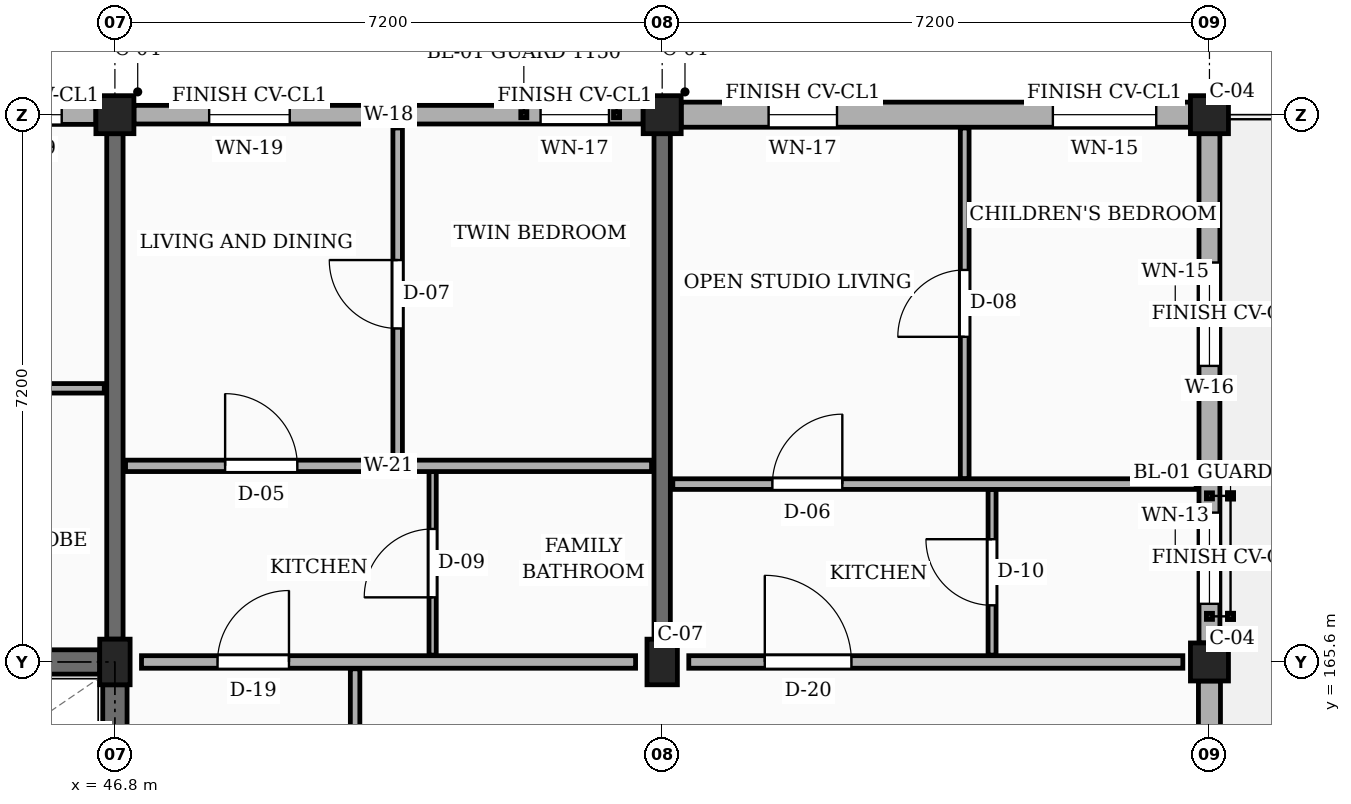
"""IFC4 building model, lengths in metres.
Left out: names, types, materials, properties, quantities, classifications, styles, units other than length and angle.
Written with IfcOpenShell. Run it as: python <this file> out.ifc"""

import sys

from ifc_helpers import new_model, si_unit, direction, frame, frame_2d, origin, origin_2d, place, context, subcontext, project, spatial, rectangle, extrude, element, fill, save


model = new_model("IFC4")
c1 = context("Model", 3, precision=1e-05, world=origin(), true_north=direction((0.0, 1.0)))
c2 = subcontext(c1, "Body", "Model", "MODEL_VIEW")
j1 = project(units=[si_unit("LENGTHUNIT", "METRE"), si_unit("PLANEANGLEUNIT", "RADIAN")], contexts=[c1])
p1 = place(None, origin())
s1 = spatial("IfcSite", under=j1, at=p1, CompositionType="ELEMENT")
p2 = place(p1, origin())
s2 = spatial("IfcBuilding", under=s1, at=p2, CompositionType="ELEMENT")
p3 = place(p2, frame((0.0, 0.0, 26.55)))
s3 = spatial("IfcBuildingStorey", under=s2, at=p3, CompositionType="ELEMENT", Elevation=26.55)
p4 = place(p3, frame((46.8, 165.6, 0.0), z_axis=(0.0, 0.0, 1.0), x_axis=(1.0, 0.0, 0.0)))
e1 = element("IfcColumn", 1, at=p4, inside=s3, PredefinedType="COLUMN", context=c2, shape_type="SweptSolid", body=[
    extrude(rectangle(XDim=0.4, YDim=0.6, at=origin_2d()), origin(), (0.0, 0.0, 1.0), 3.15),
])
p5 = place(p3, frame((46.8, 172.8, 0.0), z_axis=(0.0, 0.0, 1.0), x_axis=(1.0, 0.0, 0.0)))
e2 = element("IfcColumn", 2, at=p5, inside=s3, PredefinedType="COLUMN", context=c2, shape_type="SweptSolid", body=[
    extrude(rectangle(XDim=0.5, YDim=0.5, at=origin_2d()), origin(), (0.0, 0.0, 1.0), 3.15),
])
p6 = place(p3, frame((54.0, 165.6, 0.0), z_axis=(0.0, 0.0, 1.0), x_axis=(1.0, 0.0, 0.0)))
e3 = element("IfcColumn", 3, at=p6, inside=s3, PredefinedType="COLUMN", context=c2, shape_type="SweptSolid", body=[
    extrude(rectangle(XDim=0.4, YDim=0.6, at=origin_2d()), origin(), (0.0, 0.0, 1.0), 3.15),
])
for number, where, z_axis, x_axis in (
    (4, (54.0, 172.8, 0.0), (0.0, 0.0, 1.0), (1.0, 0.0, 0.0)),
    (5, (61.2, 165.6, 0.0), (0.0, 0.0, 1.0), (1.0, 0.0, 0.0)),
    (6, (61.2, 172.8, 0.0), (0.0, 0.0, 1.0), (1.0, 0.0, 0.0)),
):
    element("IfcColumn", number, at=place(p3, frame(where, z_axis=z_axis, x_axis=x_axis)), inside=s3, PredefinedType="COLUMN", context=c2, shape_type="SweptSolid", body=[
        extrude(rectangle(XDim=0.5, YDim=0.5, at=origin_2d()), origin(), (0.0, 0.0, 1.0), 3.15),
    ])
for number, where, z_axis, x_axis in (
    (7, (46.8, 165.9, 0.0), (0.0, 0.0, 1.0), (0.0, 1.0, 0.0)),
    (8, (54.0, 165.9, 0.0), (0.0, 0.0, 1.0), (0.0, 1.0, 0.0)),
):
    element("IfcWall", number, at=place(p3, frame(where, z_axis=z_axis, x_axis=x_axis)), inside=s3, PredefinedType="SOLIDWALL", context=c2, shape_type="SweptSolid", body=[
        extrude(rectangle(XDim=6.65, YDim=0.215, at=frame_2d((3.325, 0.0))), origin(), (0.0, 0.0, 1.0), 2.185),
    ])
p7 = place(p3, frame((61.2, 158.65, 0.0), z_axis=(0.0, 0.0, 1.0), x_axis=(0.0, 1.0, 0.0)))
e9 = element("IfcWall", 9, at=p7, inside=s3, PredefinedType="SOLIDWALL", context=c2, shape_type="SweptSolid", body=[
    extrude(rectangle(XDim=6.7, YDim=0.29, at=frame_2d((3.35, 0.0))), origin(), (0.0, 0.0, 1.0), 2.455),
])
p8 = place(p7, frame((0.45, 0.0, 0.78)))
e10 = element("IfcOpeningElement", 10, at=p8, cuts=e9, PredefinedType="OPENING", context=c2, shape_type="SweptSolid", body=[
    extrude(rectangle(XDim=1.04, YDim=1.26, at=frame_2d((0.52, 0.63))), frame((0.0, 0.155, 0.0), z_axis=(0.0, -1.0, 0.0), x_axis=(1.0, 0.0, 0.0)), (0.0, 0.0, 1.0), 0.31),
])
p9 = place(p7, frame((4.65, 0.0, 0.78)))
e11 = element("IfcOpeningElement", 11, at=p9, cuts=e9, PredefinedType="OPENING", context=c2, shape_type="SweptSolid", body=[
    extrude(rectangle(XDim=1.2, YDim=1.26, at=frame_2d((0.6, 0.63))), frame((0.0, 0.155, 0.0), z_axis=(0.0, -1.0, 0.0), x_axis=(1.0, 0.0, 0.0)), (0.0, 0.0, 1.0), 0.31),
])
p10 = place(p3, frame((61.2, 165.85, 0.0), z_axis=(0.0, 0.0, 1.0), x_axis=(0.0, 1.0, 0.0)))
e12 = element("IfcWall", 12, at=p10, inside=s3, PredefinedType="SOLIDWALL", context=c2, shape_type="SweptSolid", body=[
    extrude(rectangle(XDim=6.7, YDim=0.275, at=frame_2d((3.35, 0.0))), origin(), (0.0, 0.0, 1.0), 2.455),
])
p11 = place(p10, frame((0.515, 0.0, 0.78)))
e13 = element("IfcOpeningElement", 13, at=p11, cuts=e12, PredefinedType="OPENING", context=c2, shape_type="SweptSolid", body=[
    extrude(rectangle(XDim=1.2, YDim=1.26, at=frame_2d((0.6, 0.63))), frame((0.0, 0.147, 0.0), z_axis=(0.0, -1.0, 0.0), x_axis=(1.0, 0.0, 0.0)), (0.0, 0.0, 1.0), 0.295),
])
p12 = place(p10, frame((3.645, 0.0, 0.78)))
e14 = element("IfcOpeningElement", 14, at=p12, cuts=e12, PredefinedType="OPENING", context=c2, shape_type="SweptSolid", body=[
    extrude(rectangle(XDim=1.36, YDim=1.26, at=frame_2d((0.68, 0.63))), frame((0.0, 0.147, 0.0), z_axis=(0.0, -1.0, 0.0), x_axis=(1.0, 0.0, 0.0)), (0.0, 0.0, 1.0), 0.295),
])
p13 = place(p3, frame((60.95, 172.8, 0.0), z_axis=(0.0, 0.0, 1.0), x_axis=(-1.0, 0.0, 0.0)))
e15 = element("IfcWall", 15, at=p13, inside=s3, PredefinedType="SOLIDWALL", context=c2, shape_type="SweptSolid", body=[
    extrude(rectangle(XDim=6.7, YDim=0.33, at=frame_2d((3.35, 0.0))), origin(), (0.0, 0.0, 1.0), 2.455),
])
p14 = place(p13, frame((0.45, 0.0, 0.78)))
e16 = element("IfcOpeningElement", 16, at=p14, cuts=e15, PredefinedType="OPENING", context=c2, shape_type="SweptSolid", body=[
    extrude(rectangle(XDim=1.36, YDim=1.26, at=frame_2d((0.68, 0.63))), frame((0.0, 0.175, 0.0), z_axis=(0.0, -1.0, 0.0), x_axis=(1.0, 0.0, 0.0)), (0.0, 0.0, 1.0), 0.35),
])
p15 = place(p13, frame((4.65, 0.0, 0.78)))
e17 = element("IfcOpeningElement", 17, at=p15, cuts=e15, PredefinedType="OPENING", context=c2, shape_type="SweptSolid", body=[
    extrude(rectangle(XDim=0.9, YDim=1.36, at=frame_2d((0.45, 0.68))), frame((0.0, 0.175, 0.0), z_axis=(0.0, -1.0, 0.0), x_axis=(1.0, 0.0, 0.0)), (0.0, 0.0, 1.0), 0.35),
])
p16 = place(p3, frame((53.75, 172.8, 0.0), z_axis=(0.0, 0.0, 1.0), x_axis=(-1.0, 0.0, 0.0)))
e18 = element("IfcWall", 18, at=p16, inside=s3, PredefinedType="SOLIDWALL", context=c2, shape_type="SweptSolid", body=[
    extrude(rectangle(XDim=6.7, YDim=0.245, at=frame_2d((3.35, 0.0))), origin(), (0.0, 0.0, 1.0), 2.455),
])
p17 = place(p16, frame((0.45, 0.0, 0.78)))
e19 = element("IfcOpeningElement", 19, at=p17, cuts=e18, PredefinedType="OPENING", context=c2, shape_type="SweptSolid", body=[
    extrude(rectangle(XDim=0.9, YDim=1.36, at=frame_2d((0.45, 0.68))), frame((0.0, 0.133, 0.0), z_axis=(0.0, -1.0, 0.0), x_axis=(1.0, 0.0, 0.0)), (0.0, 0.0, 1.0), 0.265),
])
p18 = place(p16, frame((4.65, 0.0, 0.78)))
e20 = element("IfcOpeningElement", 20, at=p18, cuts=e18, PredefinedType="OPENING", context=c2, shape_type="SweptSolid", body=[
    extrude(rectangle(XDim=1.06, YDim=1.36, at=frame_2d((0.53, 0.68))), frame((0.0, 0.133, 0.0), z_axis=(0.0, -1.0, 0.0), x_axis=(1.0, 0.0, 0.0)), (0.0, 0.0, 1.0), 0.265),
])
p19 = place(p3, frame((46.55, 172.8, 0.0), z_axis=(0.0, 0.0, 1.0), x_axis=(-1.0, 0.0, 0.0)))
e21 = element("IfcWall", 21, at=p19, inside=s3, PredefinedType="SOLIDWALL", context=c2, shape_type="SweptSolid", body=[
    extrude(rectangle(XDim=6.7, YDim=0.255, at=frame_2d((3.35, 0.0))), origin(), (0.0, 0.0, 1.0), 2.455),
])
p20 = place(p19, frame((0.45, 0.0, 0.78)))
e22 = element("IfcOpeningElement", 22, at=p20, cuts=e21, PredefinedType="OPENING", context=c2, shape_type="SweptSolid", body=[
    extrude(rectangle(XDim=1.06, YDim=1.36, at=frame_2d((0.53, 0.68))), frame((0.0, 0.137, 0.0), z_axis=(0.0, -1.0, 0.0), x_axis=(1.0, 0.0, 0.0)), (0.0, 0.0, 1.0), 0.275),
])
p21 = place(p19, frame((4.65, 0.0, 0.78)))
e23 = element("IfcOpeningElement", 23, at=p21, cuts=e21, PredefinedType="OPENING", context=c2, shape_type="SweptSolid", body=[
    extrude(rectangle(XDim=1.22, YDim=1.36, at=frame_2d((0.61, 0.68))), frame((0.0, 0.137, 0.0), z_axis=(0.0, -1.0, 0.0), x_axis=(1.0, 0.0, 0.0)), (0.0, 0.0, 1.0), 0.275),
])
p22 = place(p3, frame((39.8, 165.6, 0.0), z_axis=(0.0, 0.0, 1.0), x_axis=(1.0, 0.0, 0.0)))
e24 = element("IfcWall", 24, at=p22, inside=s3, PredefinedType="SHEAR", context=c2, shape_type="SweptSolid", body=[
    extrude(rectangle(XDim=6.8, YDim=0.32, at=frame_2d((3.4, 0.0))), origin(), (0.0, 0.0, 1.0), 2.885),
])
p23 = place(p3, frame((46.8, 158.7, 0.0), z_axis=(0.0, 0.0, 1.0), x_axis=(0.0, 1.0, 0.0)))
e25 = element("IfcWall", 25, at=p23, inside=s3, PredefinedType="SHEAR", context=c2, shape_type="SweptSolid", body=[
    extrude(rectangle(XDim=6.6, YDim=0.32, at=frame_2d((3.3, 0.0))), origin(), (0.0, 0.0, 1.0), 2.885),
])
p24 = place(p3, frame((47.15, 165.6, 0.0), z_axis=(0.0, 0.0, 1.0), x_axis=(1.0, 0.0, 0.0)))
e26 = element("IfcWall", 26, at=p24, inside=s3, PredefinedType="PARTITIONING", context=c2, shape_type="SweptSolid", body=[
    extrude(rectangle(XDim=6.5, YDim=0.165, at=frame_2d((3.25, 0.0))), origin(), (0.0, 0.0, 1.0), 2.32),
])
p25 = place(p24, frame((1.0, 0.0, 0.0)))
e27 = element("IfcOpeningElement", 27, at=p25, cuts=e26, PredefinedType="OPENING", context=c2, shape_type="SweptSolid", body=[
    extrude(rectangle(XDim=0.94, YDim=2.12, at=frame_2d((0.47, 1.06))), frame((0.0, 0.093, 0.0), z_axis=(0.0, -1.0, 0.0), x_axis=(1.0, 0.0, 0.0)), (0.0, 0.0, 1.0), 0.185),
])
p26 = place(p3, frame((54.35, 165.6, 0.0), z_axis=(0.0, 0.0, 1.0), x_axis=(1.0, 0.0, 0.0)))
e28 = element("IfcWall", 28, at=p26, inside=s3, PredefinedType="PARTITIONING", context=c2, shape_type="SweptSolid", body=[
    extrude(rectangle(XDim=6.5, YDim=0.165, at=frame_2d((3.25, 0.0))), origin(), (0.0, 0.0, 1.0), 2.32),
])
p27 = place(p26, frame((1.0, 0.0, 0.0)))
e29 = element("IfcOpeningElement", 29, at=p27, cuts=e28, PredefinedType="OPENING", context=c2, shape_type="SweptSolid", body=[
    extrude(rectangle(XDim=1.14, YDim=2.18, at=frame_2d((0.57, 1.09))), frame((0.0, 0.093, 0.0), z_axis=(0.0, -1.0, 0.0), x_axis=(1.0, 0.0, 0.0)), (0.0, 0.0, 1.0), 0.185),
])
p28 = place(p3, frame((39.74, 169.2, 0.0), z_axis=(0.0, 0.0, 1.0), x_axis=(1.0, 0.0, 0.0)))
e30 = element("IfcWall", 30, at=p28, inside=s3, PredefinedType="PARTITIONING", context=c2, shape_type="SweptSolid", body=[
    extrude(rectangle(XDim=6.92, YDim=0.125, at=frame_2d((3.46, 0.0))), origin(), (0.0, 0.0, 1.0), 2.32),
])
p29 = place(p28, frame((1.05, 0.0, 0.0)))
e31 = element("IfcOpeningElement", 31, at=p29, cuts=e30, PredefinedType="OPENING", context=c2, shape_type="SweptSolid", body=[
    extrude(rectangle(XDim=0.87, YDim=2.05, at=frame_2d((0.435, 1.025))), frame((0.0, 0.073, 0.0), z_axis=(0.0, -1.0, 0.0), x_axis=(1.0, 0.0, 0.0)), (0.0, 0.0, 1.0), 0.145),
])
p30 = place(p28, frame((4.45, 0.0, 0.0)))
e32 = element("IfcOpeningElement", 32, at=p30, cuts=e30, PredefinedType="OPENING", context=c2, shape_type="SweptSolid", body=[
    extrude(rectangle(XDim=0.88, YDim=2.08, at=frame_2d((0.44, 1.04))), frame((0.0, 0.073, 0.0), z_axis=(0.0, -1.0, 0.0), x_axis=(1.0, 0.0, 0.0)), (0.0, 0.0, 1.0), 0.145),
])
p31 = place(p3, frame((49.96, 158.49, 0.0), z_axis=(0.0, 0.0, 1.0), x_axis=(0.0, 1.0, 0.0)))
e33 = element("IfcWall", 33, at=p31, inside=s3, PredefinedType="PARTITIONING", context=c2, shape_type="SweptSolid", body=[
    extrude(rectangle(XDim=7.02, YDim=0.125, at=frame_2d((3.51, 0.0))), origin(), (0.0, 0.0, 1.0), 2.32),
])
p32 = place(p31, frame((2.85, 0.0, 0.0)))
e34 = element("IfcOpeningElement", 34, at=p32, cuts=e33, PredefinedType="OPENING", context=c2, shape_type="SweptSolid", body=[
    extrude(rectangle(XDim=1.02, YDim=2.15, at=frame_2d((0.51, 1.075))), frame((0.0, 0.073, 0.0), z_axis=(0.0, -1.0, 0.0), x_axis=(1.0, 0.0, 0.0)), (0.0, 0.0, 1.0), 0.145),
])
p33 = place(p3, frame((50.52, 168.25, 0.0), z_axis=(0.0, 0.0, 1.0), x_axis=(0.0, 1.0, 0.0)))
e35 = element("IfcWall", 35, at=p33, inside=s3, PredefinedType="PARTITIONING", context=c2, shape_type="SweptSolid", body=[
    extrude(rectangle(XDim=4.375, YDim=0.125, at=frame_2d((2.188, 0.0))), origin(), (0.0, 0.0, 1.0), 2.32),
])
p34 = place(p33, frame((1.738, 0.0, 0.0)))
e36 = element("IfcOpeningElement", 36, at=p34, cuts=e35, PredefinedType="OPENING", context=c2, shape_type="SweptSolid", body=[
    extrude(rectangle(XDim=0.9, YDim=2.1, at=frame_2d((0.45, 1.05))), frame((0.0, 0.073, 0.0), z_axis=(0.0, -1.0, 0.0), x_axis=(1.0, 0.0, 0.0)), (0.0, 0.0, 1.0), 0.145),
])
p35 = place(p3, frame((50.98, 165.69, 0.0), z_axis=(0.0, 0.0, 1.0), x_axis=(0.0, 1.0, 0.0)))
e37 = element("IfcWall", 37, at=p35, inside=s3, PredefinedType="PARTITIONING", context=c2, shape_type="SweptSolid", body=[
    extrude(rectangle(XDim=2.42, YDim=0.095, at=frame_2d((1.21, 0.0))), origin(), (0.0, 0.0, 1.0), 2.32),
])
p36 = place(p35, frame((0.76, 0.0, 0.0)))
e38 = element("IfcOpeningElement", 38, at=p36, cuts=e37, PredefinedType="OPENING", context=c2, shape_type="SweptSolid", body=[
    extrude(rectangle(XDim=0.9, YDim=2.05, at=frame_2d((0.45, 1.025))), frame((0.0, 0.058, 0.0), z_axis=(0.0, -1.0, 0.0), x_axis=(1.0, 0.0, 0.0)), (0.0, 0.0, 1.0), 0.115),
])
p37 = place(p3, frame((46.94, 168.18, 0.0), z_axis=(0.0, 0.0, 1.0), x_axis=(1.0, 0.0, 0.0)))
e39 = element("IfcWall", 39, at=p37, inside=s3, PredefinedType="PARTITIONING", context=c2, shape_type="SweptSolid", body=[
    extrude(rectangle(XDim=6.92, YDim=0.15, at=frame_2d((3.46, 0.0))), origin(), (0.0, 0.0, 1.0), 2.32),
])
p38 = place(p37, frame((1.31, 0.0, 0.0)))
e40 = element("IfcOpeningElement", 40, at=p38, cuts=e39, PredefinedType="OPENING", context=c2, shape_type="SweptSolid", body=[
    extrude(rectangle(XDim=0.95, YDim=2.1, at=frame_2d((0.475, 1.05))), frame((0.0, 0.085, 0.0), z_axis=(0.0, -1.0, 0.0), x_axis=(1.0, 0.0, 0.0)), (0.0, 0.0, 1.0), 0.17),
])
p39 = place(p3, frame((57.98, 168.01, 0.0), z_axis=(0.0, 0.0, 1.0), x_axis=(0.0, 1.0, 0.0)))
e41 = element("IfcWall", 41, at=p39, inside=s3, PredefinedType="PARTITIONING", context=c2, shape_type="SweptSolid", body=[
    extrude(rectangle(XDim=4.615, YDim=0.115, at=frame_2d((2.308, 0.0))), origin(), (0.0, 0.0, 1.0), 2.32),
])
p40 = place(p39, frame((1.867, 0.0, 0.0)))
e42 = element("IfcOpeningElement", 42, at=p40, cuts=e41, PredefinedType="OPENING", context=c2, shape_type="SweptSolid", body=[
    extrude(rectangle(XDim=0.88, YDim=2.08, at=frame_2d((0.44, 1.04))), frame((0.0, 0.067, 0.0), z_axis=(0.0, -1.0, 0.0), x_axis=(1.0, 0.0, 0.0)), (0.0, 0.0, 1.0), 0.135),
])
p41 = place(p3, frame((58.34, 165.69, 0.0), z_axis=(0.0, 0.0, 1.0), x_axis=(0.0, 1.0, 0.0)))
e43 = element("IfcWall", 43, at=p41, inside=s3, PredefinedType="PARTITIONING", context=c2, shape_type="SweptSolid", body=[
    extrude(rectangle(XDim=2.18, YDim=0.105, at=frame_2d((1.09, 0.0))), origin(), (0.0, 0.0, 1.0), 2.32),
])
p42 = place(p41, frame((0.655, 0.0, 0.0)))
e44 = element("IfcOpeningElement", 44, at=p42, cuts=e43, PredefinedType="OPENING", context=c2, shape_type="SweptSolid", body=[
    extrude(rectangle(XDim=0.87, YDim=2.05, at=frame_2d((0.435, 1.025))), frame((0.0, 0.062, 0.0), z_axis=(0.0, -1.0, 0.0), x_axis=(1.0, 0.0, 0.0)), (0.0, 0.0, 1.0), 0.125),
])
p43 = place(p3, frame((54.14, 167.94, 0.0), z_axis=(0.0, 0.0, 1.0), x_axis=(1.0, 0.0, 0.0)))
e45 = element("IfcWall", 45, at=p43, inside=s3, PredefinedType="PARTITIONING", context=c2, shape_type="SweptSolid", body=[
    extrude(rectangle(XDim=6.885, YDim=0.14, at=frame_2d((3.442, 0.0))), origin(), (0.0, 0.0, 1.0), 2.32),
])
p44 = place(p43, frame((1.31, 0.0, 0.0)))
e46 = element("IfcOpeningElement", 46, at=p44, cuts=e45, PredefinedType="OPENING", context=c2, shape_type="SweptSolid", body=[
    extrude(rectangle(XDim=0.92, YDim=2.1, at=frame_2d((0.46, 1.05))), frame((0.0, 0.08, 0.0), z_axis=(0.0, -1.0, 0.0), x_axis=(1.0, 0.0, 0.0)), (0.0, 0.0, 1.0), 0.16),
])
p45 = place(p11, origin())
e47 = element("IfcWindow", 47, at=p45, inside=s3, PartitioningType="SINGLE_PANEL", PredefinedType="WINDOW", context=c2, shape_type="SweptSolid", body=[
    extrude(rectangle(XDim=1.2, YDim=1.26, at=frame_2d((0.6, 0.63))), frame((0.0, 0.03, 0.0), z_axis=(0.0, -1.0, 0.0), x_axis=(1.0, 0.0, 0.0)), (0.0, 0.0, 1.0), 0.06),
])
fill(e13, e47)
p46 = place(p12, origin())
e48 = element("IfcWindow", 48, at=p46, inside=s3, PartitioningType="SINGLE_PANEL", PredefinedType="WINDOW", context=c2, shape_type="SweptSolid", body=[
    extrude(rectangle(XDim=1.36, YDim=1.26, at=frame_2d((0.68, 0.63))), frame((0.0, 0.03, 0.0), z_axis=(0.0, -1.0, 0.0), x_axis=(1.0, 0.0, 0.0)), (0.0, 0.0, 1.0), 0.06),
])
fill(e14, e48)
p47 = place(p14, origin())
e49 = element("IfcWindow", 49, at=p47, inside=s3, PartitioningType="SINGLE_PANEL", PredefinedType="WINDOW", context=c2, shape_type="SweptSolid", body=[
    extrude(rectangle(XDim=1.36, YDim=1.26, at=frame_2d((0.68, 0.63))), frame((0.0, 0.03, 0.0), z_axis=(0.0, -1.0, 0.0), x_axis=(1.0, 0.0, 0.0)), (0.0, 0.0, 1.0), 0.06),
])
fill(e16, e49)
p48 = place(p15, origin())
e50 = element("IfcWindow", 50, at=p48, inside=s3, PartitioningType="SINGLE_PANEL", PredefinedType="WINDOW", context=c2, shape_type="SweptSolid", body=[
    extrude(rectangle(XDim=0.9, YDim=1.36, at=frame_2d((0.45, 0.68))), frame((0.0, 0.03, 0.0), z_axis=(0.0, -1.0, 0.0), x_axis=(1.0, 0.0, 0.0)), (0.0, 0.0, 1.0), 0.06),
])
fill(e17, e50)
p49 = place(p17, origin())
e51 = element("IfcWindow", 51, at=p49, inside=s3, PartitioningType="SINGLE_PANEL", PredefinedType="WINDOW", context=c2, shape_type="SweptSolid", body=[
    extrude(rectangle(XDim=0.9, YDim=1.36, at=frame_2d((0.45, 0.68))), frame((0.0, 0.03, 0.0), z_axis=(0.0, -1.0, 0.0), x_axis=(1.0, 0.0, 0.0)), (0.0, 0.0, 1.0), 0.06),
])
fill(e19, e51)
p50 = place(p18, origin())
e52 = element("IfcWindow", 52, at=p50, inside=s3, PartitioningType="SINGLE_PANEL", PredefinedType="WINDOW", context=c2, shape_type="SweptSolid", body=[
    extrude(rectangle(XDim=1.06, YDim=1.36, at=frame_2d((0.53, 0.68))), frame((0.0, 0.03, 0.0), z_axis=(0.0, -1.0, 0.0), x_axis=(1.0, 0.0, 0.0)), (0.0, 0.0, 1.0), 0.06),
])
fill(e20, e52)
p51 = place(p20, origin())
e53 = element("IfcWindow", 53, at=p51, inside=s3, PartitioningType="SINGLE_PANEL", PredefinedType="WINDOW", context=c2, shape_type="SweptSolid", body=[
    extrude(rectangle(XDim=1.06, YDim=1.36, at=frame_2d((0.53, 0.68))), frame((0.0, 0.03, 0.0), z_axis=(0.0, -1.0, 0.0), x_axis=(1.0, 0.0, 0.0)), (0.0, 0.0, 1.0), 0.06),
])
fill(e22, e53)
p52 = place(p25, origin())
e54 = element("IfcDoor", 54, at=p52, inside=s3, OperationType="SINGLE_SWING_RIGHT", PredefinedType="DOOR", context=c2, shape_type="SweptSolid", body=[
    extrude(rectangle(XDim=0.94, YDim=2.12, at=frame_2d((0.47, 1.06))), frame((0.0, 0.025, 0.0), z_axis=(0.0, -1.0, 0.0), x_axis=(1.0, 0.0, 0.0)), (0.0, 0.0, 1.0), 0.05),
])
fill(e27, e54)
p53 = place(p27, origin())
e55 = element("IfcDoor", 55, at=p53, inside=s3, OperationType="SINGLE_SWING_LEFT", PredefinedType="DOOR", context=c2, shape_type="SweptSolid", body=[
    extrude(rectangle(XDim=1.14, YDim=2.18, at=frame_2d((0.57, 1.09))), frame((0.0, 0.025, 0.0), z_axis=(0.0, -1.0, 0.0), x_axis=(1.0, 0.0, 0.0)), (0.0, 0.0, 1.0), 0.05),
])
fill(e29, e55)
p54 = place(p34, origin())
e56 = element("IfcDoor", 56, at=p54, inside=s3, OperationType="SINGLE_SWING_RIGHT", PredefinedType="DOOR", context=c2, shape_type="SweptSolid", body=[
    extrude(rectangle(XDim=0.9, YDim=2.1, at=frame_2d((0.45, 1.05))), frame((0.0, 0.025, 0.0), z_axis=(0.0, -1.0, 0.0), x_axis=(1.0, 0.0, 0.0)), (0.0, 0.0, 1.0), 0.05),
])
fill(e36, e56)
p55 = place(p36, origin())
e57 = element("IfcDoor", 57, at=p55, inside=s3, OperationType="SINGLE_SWING_LEFT", PredefinedType="DOOR", context=c2, shape_type="SweptSolid", body=[
    extrude(rectangle(XDim=0.9, YDim=2.05, at=frame_2d((0.45, 1.025))), frame((0.0, 0.025, 0.0), z_axis=(0.0, -1.0, 0.0), x_axis=(1.0, 0.0, 0.0)), (0.0, 0.0, 1.0), 0.05),
])
fill(e38, e57)
p56 = place(p38, origin())
e58 = element("IfcDoor", 58, at=p56, inside=s3, OperationType="SINGLE_SWING_LEFT", PredefinedType="DOOR", context=c2, shape_type="SweptSolid", body=[
    extrude(rectangle(XDim=0.95, YDim=2.1, at=frame_2d((0.475, 1.05))), frame((0.0, 0.025, 0.0), z_axis=(0.0, -1.0, 0.0), x_axis=(1.0, 0.0, 0.0)), (0.0, 0.0, 1.0), 0.05),
])
fill(e40, e58)
p57 = place(p40, origin())
e59 = element("IfcDoor", 59, at=p57, inside=s3, OperationType="SINGLE_SWING_LEFT", PredefinedType="DOOR", context=c2, shape_type="SweptSolid", body=[
    extrude(rectangle(XDim=0.88, YDim=2.08, at=frame_2d((0.44, 1.04))), frame((0.0, 0.025, 0.0), z_axis=(0.0, -1.0, 0.0), x_axis=(1.0, 0.0, 0.0)), (0.0, 0.0, 1.0), 0.05),
])
fill(e42, e59)
p58 = place(p42, origin())
e60 = element("IfcDoor", 60, at=p58, inside=s3, OperationType="SINGLE_SWING_RIGHT", PredefinedType="DOOR", context=c2, shape_type="SweptSolid", body=[
    extrude(rectangle(XDim=0.87, YDim=2.05, at=frame_2d((0.435, 1.025))), frame((0.0, 0.025, 0.0), z_axis=(0.0, -1.0, 0.0), x_axis=(1.0, 0.0, 0.0)), (0.0, 0.0, 1.0), 0.05),
])
fill(e44, e60)
p59 = place(p44, origin())
e61 = element("IfcDoor", 61, at=p59, inside=s3, OperationType="SINGLE_SWING_RIGHT", PredefinedType="DOOR", context=c2, shape_type="SweptSolid", body=[
    extrude(rectangle(XDim=0.92, YDim=2.1, at=frame_2d((0.46, 1.05))), frame((0.0, 0.025, 0.0), z_axis=(0.0, -1.0, 0.0), x_axis=(1.0, 0.0, 0.0)), (0.0, 0.0, 1.0), 0.05),
])
fill(e46, e61)
save(model, sys.argv[1])
